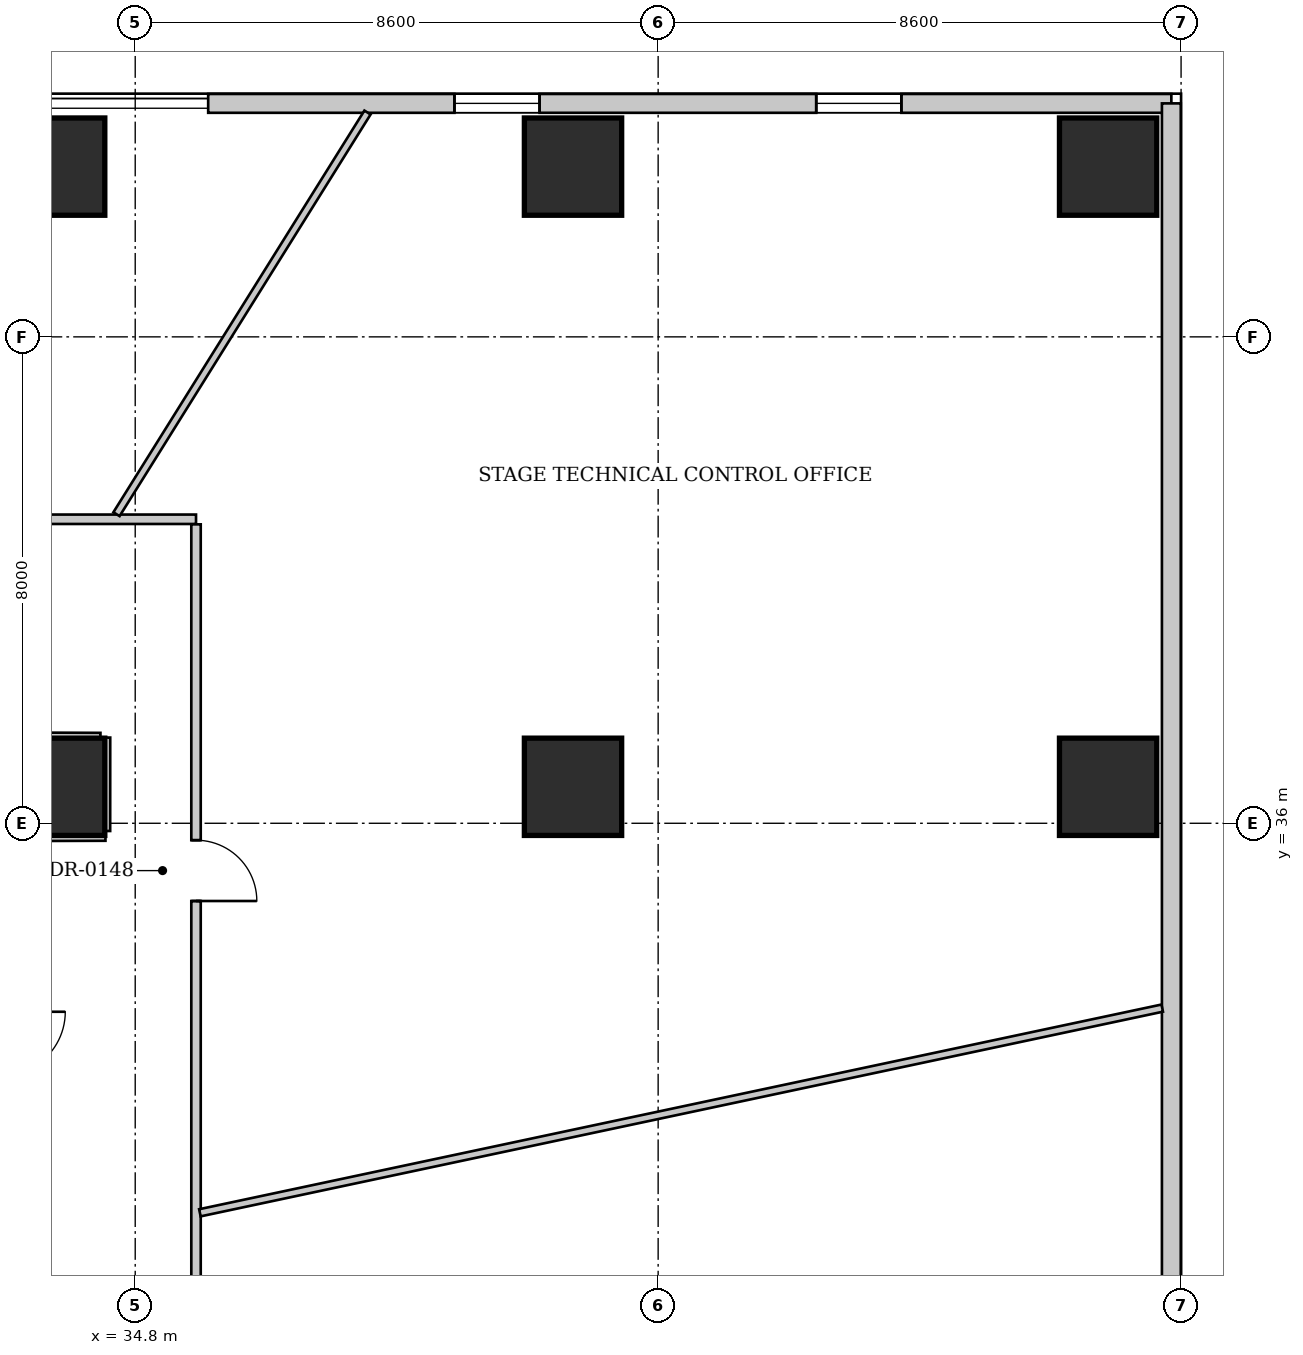
"""IFC4 building model, lengths in metres.
Left out: names, types, materials, properties, quantities, classifications, styles, units other than length and angle.
Written with IfcOpenShell. Run it as: python <this file> out.ifc"""

import sys

from ifc_helpers import new_model, si_unit, direction, frame, frame_2d, origin, origin_2d, place, context, subcontext, project, spatial, rectangle, extrude, source, transform, mapped, element, fill, save


model = new_model("IFC4")
c1 = context("Model", 3, precision=1e-05, world=origin(), true_north=direction((0.0, 1.0)))
c2 = subcontext(c1, "Body", "Model", "MODEL_VIEW")
j1 = project(units=[si_unit("LENGTHUNIT", "METRE"), si_unit("PLANEANGLEUNIT", "RADIAN")], contexts=[c1])
p1 = place(None, origin())
s1 = spatial("IfcSite", under=j1, at=p1, CompositionType="ELEMENT")
p2 = place(p1, origin())
s2 = spatial("IfcBuilding", under=s1, at=p2, CompositionType="ELEMENT")
p3 = place(p2, frame((0.0, 0.0, 9.8)))
s3 = spatial("IfcBuildingStorey", under=s2, at=p3, CompositionType="ELEMENT", Elevation=9.8)
for number, where, z_axis, x_axis in (
    (1, (50.8, 36.6, 0.0), (0.0, 0.0, 1.0), (1.0, 0.0, 0.0)),
    (2, (50.8, 46.8, 0.0), (0.0, 0.0, 1.0), (1.0, 0.0, 0.0)),
    (3, (33.5, 46.8, 0.0), (0.0, 0.0, 1.0), (1.0, 0.0, 0.0)),
    (4, (42.0, 46.8, 0.0), (0.0, 0.0, 1.0), (1.0, 0.0, 0.0)),
    (5, (33.5, 36.6, 0.0), (0.0, 0.0, 1.0), (1.0, 0.0, 0.0)),
    (6, (42.0, 36.6, 0.0), (0.0, 0.0, 1.0), (1.0, 0.0, 0.0)),
):
    element("IfcColumn", number, at=place(p3, frame(where, z_axis=z_axis, x_axis=x_axis)), inside=s3, PredefinedType="COLUMN", context=c2, shape_type="SweptSolid", body=[
        extrude(rectangle(XDim=1.6, YDim=1.6, at=origin_2d()), origin(), (0.0, 0.0, 1.0), 4.3),
    ])
p4 = place(p3, frame((36.0, 47.84, 0.0), z_axis=(0.0, 0.0, 1.0), x_axis=(1.0, 0.0, 0.0)))
e7 = element("IfcWall", 7, at=p4, inside=s3, PredefinedType="SOLIDWALL", context=c2, shape_type="SweptSolid", body=[
    extrude(rectangle(XDim=15.84, YDim=0.31, at=frame_2d((7.92, 0.0))), origin(), (0.0, 0.0, 1.0), 4.05),
])
p5 = place(p4, frame((4.05, 0.0, 0.95)))
e8 = element("IfcOpeningElement", 8, at=p5, cuts=e7, PredefinedType="OPENING", context=c2, shape_type="SweptSolid", body=[
    extrude(rectangle(XDim=1.4, YDim=2.2, at=frame_2d((0.7, 1.1))), frame((0.0, 0.165, 0.0), z_axis=(0.0, -1.0, 0.0), x_axis=(1.0, 0.0, 0.0)), (0.0, 0.0, 1.0), 0.33),
])
p6 = place(p4, frame((10.0, 0.0, 0.95)))
e9 = element("IfcOpeningElement", 9, at=p6, cuts=e7, PredefinedType="OPENING", context=c2, shape_type="SweptSolid", body=[
    extrude(rectangle(XDim=1.4, YDim=2.2, at=frame_2d((0.7, 1.1))), frame((0.0, 0.165, 0.0), z_axis=(0.0, -1.0, 0.0), x_axis=(1.0, 0.0, 0.0)), (0.0, 0.0, 1.0), 0.33),
])
p7 = place(p3, frame((51.84, 47.84, 0.0), z_axis=(0.0, 0.0, 1.0), x_axis=(0.0, -1.0, 0.0)))
e10 = element("IfcWall", 10, at=p7, inside=s3, PredefinedType="SOLIDWALL", context=c2, shape_type="SweptSolid", body=[
    extrude(rectangle(XDim=39.68, YDim=0.31, at=frame_2d((19.84, 0.0))), origin(), (0.0, 0.0, 1.0), 4.05),
])
p8 = place(p3, frame((21.6, 41.0, 0.0), z_axis=(0.0, 0.0, 1.0), x_axis=(1.0, 0.0, 0.0)))
e11 = element("IfcWall", 11, at=p8, inside=s3, PredefinedType="PARTITIONING", context=c2, shape_type="SweptSolid", body=[
    extrude(rectangle(XDim=14.2, YDim=0.155, at=frame_2d((7.1, 0.0))), origin(), (0.0, 0.0, 1.0), 4.3),
])
p9 = place(p8, frame((7.065, 0.0, 0.0)))
e12 = element("IfcOpeningElement", 12, at=p9, cuts=e11, PredefinedType="OPENING", context=c2, shape_type="SweptSolid", body=[
    extrude(rectangle(XDim=0.95, YDim=2.15, at=frame_2d((0.475, 1.075))), frame((0.0, 0.087, 0.0), z_axis=(0.0, -1.0, 0.0), x_axis=(1.0, 0.0, 0.0)), (0.0, 0.0, 1.0), 0.175),
])
p10 = place(p3, frame((35.8, 40.917, 0.0), z_axis=(0.0, 0.0, 1.0), x_axis=(0.0, -1.0, 0.0)))
e13 = element("IfcWall", 13, at=p10, inside=s3, PredefinedType="PARTITIONING", context=c2, shape_type="SweptSolid", body=[
    extrude(rectangle(XDim=14.796, YDim=0.155, at=frame_2d((7.398, 0.0))), origin(), (0.0, 0.0, 1.0), 4.3),
])
p11 = place(p10, frame((5.195, 0.0, 0.0)))
e14 = element("IfcOpeningElement", 14, at=p11, cuts=e13, PredefinedType="OPENING", context=c2, shape_type="SweptSolid", body=[
    extrude(rectangle(XDim=1.0, YDim=2.15, at=frame_2d((0.5, 1.075))), frame((0.0, 0.087, 0.0), z_axis=(0.0, -1.0, 0.0), x_axis=(1.0, 0.0, 0.0)), (0.0, 0.0, 1.0), 0.175),
])
p12 = place(p3, frame((32.87, 35.785, 0.0), z_axis=(0.0, 0.0, 1.0), x_axis=(0.99999584892, 0.002881343971, 0.0)))
e15 = element("IfcWall", 15, at=p12, inside=s3, PredefinedType="PARTITIONING", context=c2, shape_type="SweptSolid", body=[
    extrude(rectangle(XDim=1.44, YDim=0.155, at=frame_2d((0.72, 0.0))), origin(), (0.0, 0.0, 1.0), 4.3),
])
p13 = place(p3, frame((34.311, 35.873, 0.0), z_axis=(0.0, 0.0, 1.0), x_axis=(0.000476644369, 0.999999886405, 0.0)))
e16 = element("IfcWall", 16, at=p13, inside=s3, PredefinedType="PARTITIONING", context=c2, shape_type="SweptSolid", body=[
    extrude(rectangle(XDim=1.537, YDim=0.155, at=frame_2d((0.768, 0.0))), origin(), (0.0, 0.0, 1.0), 4.3),
])
p14 = place(p3, frame((34.228, 37.41, 0.0), z_axis=(0.0, 0.0, 1.0), x_axis=(-0.999993554729, 0.003590334185, 0.0)))
e17 = element("IfcWall", 17, at=p14, inside=s3, PredefinedType="PARTITIONING", context=c2, shape_type="SweptSolid", body=[
    extrude(rectangle(XDim=1.428, YDim=0.155, at=frame_2d((0.714, 0.0))), origin(), (0.0, 0.0, 1.0), 4.3),
])
p15 = place(p3, frame((35.864, 29.594, 0.0), z_axis=(0.0, 0.0, 1.0), x_axis=(0.978116840554, 0.208056353481, 0.0)))
e18 = element("IfcWall", 18, at=p15, inside=s3, PredefinedType="PARTITIONING", context=c2, shape_type="SweptSolid", body=[
    extrude(rectangle(XDim=16.18, YDim=0.12, at=frame_2d((8.09, 0.0))), origin(), (0.0, 0.0, 1.0), 4.3),
])
p16 = place(p3, frame((34.492, 41.083, 0.0), z_axis=(0.0, 0.0, 1.0), x_axis=(0.529897521228, 0.848061682306, 0.0)))
e19 = element("IfcWall", 19, at=p16, inside=s3, PredefinedType="PARTITIONING", context=c2, shape_type="SweptSolid", body=[
    extrude(rectangle(XDim=7.79, YDim=0.12, at=frame_2d((3.895, 0.0))), origin(), (0.0, 0.0, 1.0), 4.3),
])
m1 = source(origin(), c2, "Body", "SweptSolid", [
    extrude(rectangle(XDim=1.4, YDim=2.2, at=frame_2d((0.7, 1.1))), frame((0.0, 0.03, 0.0), z_axis=(0.0, -1.0, 0.0), x_axis=(1.0, 0.0, 0.0)), (0.0, 0.0, 1.0), 0.06),
])
p17 = place(p5, origin())
e20 = element("IfcWindow", 20, at=p17, inside=s3, PartitioningType="SINGLE_PANEL", PredefinedType="WINDOW", context=c2, shape_type="MappedRepresentation", body=[
    mapped(m1, transform((0.0, 0.0, 0.0), x_axis=(1.0, 0.0, 0.0), y_axis=(0.0, 1.0, 0.0), z_axis=(0.0, 0.0, 1.0), scale=1.0)),
])
fill(e8, e20)
p18 = place(p6, origin())
e21 = element("IfcWindow", 21, at=p18, inside=s3, PartitioningType="SINGLE_PANEL", PredefinedType="WINDOW", context=c2, shape_type="MappedRepresentation", body=[
    mapped(m1, transform((0.0, 0.0, 0.0), x_axis=(1.0, 0.0, 0.0), y_axis=(0.0, 1.0, 0.0), z_axis=(0.0, 0.0, 1.0), scale=1.0)),
])
fill(e9, e21)
m2 = source(origin(), c2, "Body", "SweptSolid", [
    extrude(rectangle(XDim=1.0, YDim=2.15, at=frame_2d((0.5, 1.075))), frame((0.0, 0.025, 0.0), z_axis=(0.0, -1.0, 0.0), x_axis=(1.0, 0.0, 0.0)), (0.0, 0.0, 1.0), 0.05),
])
p19 = place(p11, origin())
e22 = element("IfcDoor", 22, at=p19, inside=s3, OperationType="SINGLE_SWING_RIGHT", PredefinedType="DOOR", context=c2, shape_type="MappedRepresentation", body=[
    mapped(m2, transform((0.0, 0.0, 0.0), x_axis=(1.0, 0.0, 0.0), y_axis=(0.0, 1.0, 0.0), z_axis=(0.0, 0.0, 1.0), scale=1.0)),
])
fill(e14, e22)
save(model, sys.argv[1])
